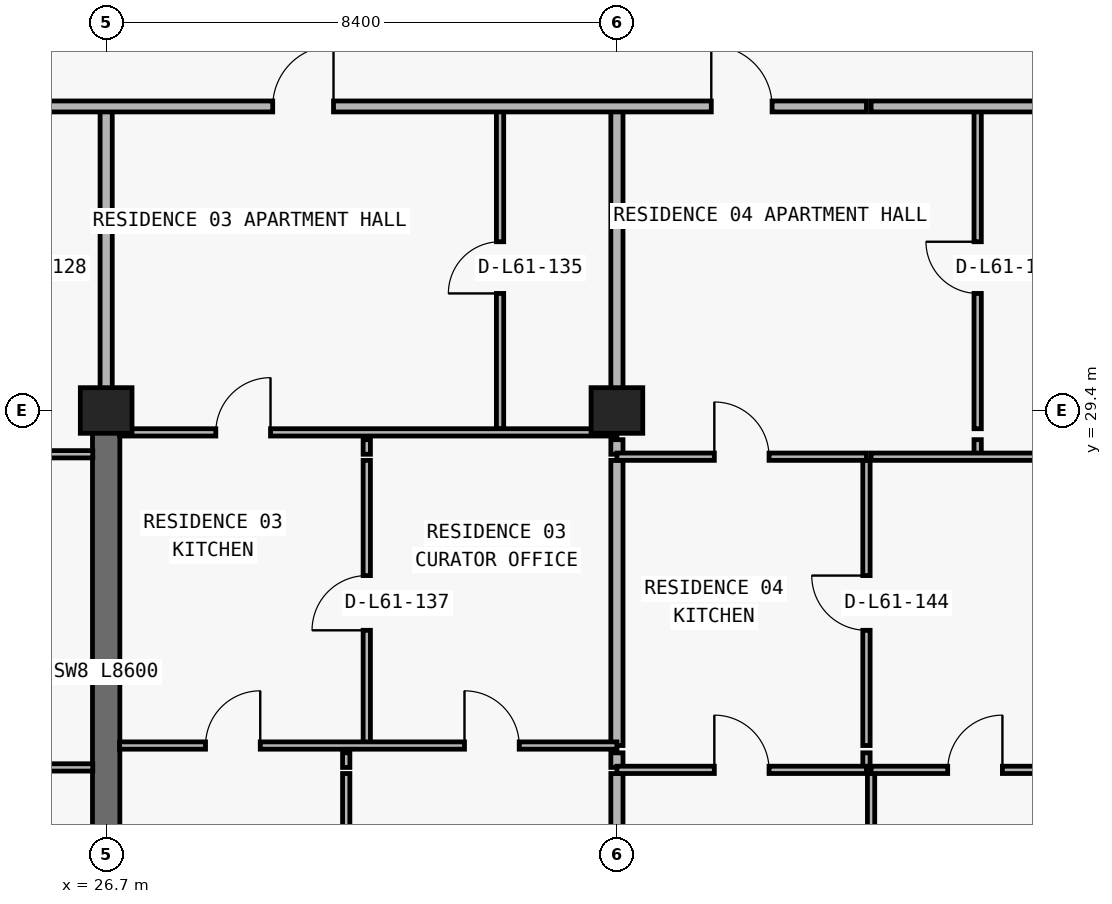
"""IFC4 building model, lengths in metres.
Left out: names, types, materials, properties, quantities, classifications, styles, units other than length and angle.
Written with IfcOpenShell. Run it as: python <this file> out.ifc"""

import sys

from ifc_helpers import new_model, si_unit, direction, frame, frame_2d, origin, origin_2d, place, context, subcontext, project, spatial, rectangle, extrude, element, fill, save


model = new_model("IFC4")
c1 = context("Model", 3, precision=1e-05, world=origin(), true_north=direction((0.0, 1.0)))
c2 = subcontext(c1, "Body", "Model", "MODEL_VIEW")
j1 = project(units=[si_unit("LENGTHUNIT", "METRE"), si_unit("PLANEANGLEUNIT", "RADIAN")], contexts=[c1])
p1 = place(None, origin())
s1 = spatial("IfcSite", under=j1, at=p1, CompositionType="ELEMENT")
p2 = place(p1, origin())
s2 = spatial("IfcBuilding", under=s1, at=p2, CompositionType="ELEMENT")
p3 = place(p2, frame((0.0, 0.0, 218.1)))
s3 = spatial("IfcBuildingStorey", under=s2, at=p3, CompositionType="ELEMENT", Elevation=218.1)
for number, where, z_axis, x_axis in (
    (1, (26.7, 29.4, 0.0), (0.0, 0.0, 1.0), (1.0, 0.0, 0.0)),
    (2, (35.1, 29.4, 0.0), (0.0, 0.0, 1.0), (1.0, 0.0, 0.0)),
):
    element("IfcColumn", number, at=place(p3, frame(where, z_axis=z_axis, x_axis=x_axis)), inside=s3, PredefinedType="COLUMN", context=c2, shape_type="SweptSolid", body=[
        extrude(rectangle(XDim=0.85, YDim=0.75, at=origin_2d()), origin(), (0.0, 0.0, 1.0), 3.0),
    ])
p4 = place(p3, frame((26.7, 20.8, 0.0), z_axis=(0.0, 0.0, 1.0), x_axis=(0.0, 1.0, 0.0)))
e3 = element("IfcWall", 3, at=p4, inside=s3, PredefinedType="SHEAR", context=c2, shape_type="SweptSolid", body=[
    extrude(rectangle(XDim=8.6, YDim=0.45, at=frame_2d((4.3, 0.0))), origin(), (0.0, 0.0, 1.0), 3.0),
])
p5 = place(p3, frame((26.7, 29.405, 0.0), z_axis=(0.0, 0.0, 1.0), x_axis=(0.0, 1.0, 0.0)))
e4 = element("IfcWall", 4, at=p5, inside=s3, PredefinedType="PARTITIONING", context=c2, shape_type="SweptSolid", body=[
    extrude(rectangle(XDim=4.995, YDim=0.2, at=frame_2d((2.498, 0.0))), origin(), (0.0, 0.0, 1.0), 2.285),
])
p6 = place(p3, frame((30.648, 11.24, 0.0), z_axis=(0.0, 0.0, 1.0), x_axis=(0.0, 1.0, 0.0)))
e5 = element("IfcWall", 5, at=p6, inside=s3, PredefinedType="PARTITIONING", context=c2, shape_type="SweptSolid", body=[
    extrude(rectangle(XDim=12.19, YDim=0.12, at=frame_2d((6.095, 0.0))), origin(), (0.0, 0.0, 1.0), 3.0),
])
p7 = place(p3, frame((30.648, 23.53, 0.0), z_axis=(0.0, 0.0, 1.0), x_axis=(0.0, 1.0, 0.0)))
e6 = element("IfcWall", 6, at=p7, inside=s3, PredefinedType="PARTITIONING", context=c2, shape_type="SweptSolid", body=[
    extrude(rectangle(XDim=0.24, YDim=0.12, at=frame_2d((0.12, 0.0))), origin(), (0.0, 0.0, 1.0), 3.0),
])
p8 = place(p3, frame((30.986, 23.89, 0.0), z_axis=(0.0, 0.0, 1.0), x_axis=(0.0, 1.0, 0.0)))
e7 = element("IfcWall", 7, at=p8, inside=s3, PredefinedType="PARTITIONING", context=c2, shape_type="SweptSolid", body=[
    extrude(rectangle(XDim=4.69, YDim=0.12, at=frame_2d((2.345, 0.0))), origin(), (0.0, 0.0, 1.0), 2.449),
])
p9 = place(p8, frame((1.895, 0.0, 0.0)))
e8 = element("IfcOpeningElement", 8, at=p9, cuts=e7, PredefinedType="OPENING", context=c2, shape_type="SweptSolid", body=[
    extrude(rectangle(XDim=0.9, YDim=2.15, at=frame_2d((0.45, 1.075))), frame((0.0, 0.07, 0.0), z_axis=(0.0, -1.0, 0.0), x_axis=(1.0, 0.0, 0.0)), (0.0, 0.0, 1.0), 0.14),
])
p10 = place(p3, frame((30.986, 28.68, 0.0), z_axis=(0.0, 0.0, 1.0), x_axis=(0.0, 1.0, 0.0)))
e9 = element("IfcWall", 9, at=p10, inside=s3, PredefinedType="PARTITIONING", context=c2, shape_type="SweptSolid", body=[
    extrude(rectangle(XDim=0.24, YDim=0.12, at=frame_2d((0.12, 0.0))), origin(), (0.0, 0.0, 1.0), 2.449),
])
p11 = place(p3, frame((33.178, 29.1, 0.0), z_axis=(0.0, 0.0, 1.0), x_axis=(0.0, 1.0, 0.0)))
e10 = element("IfcWall", 10, at=p11, inside=s3, PredefinedType="PARTITIONING", context=c2, shape_type="SweptSolid", body=[
    extrude(rectangle(XDim=5.3, YDim=0.12, at=frame_2d((2.65, 0.0))), origin(), (0.0, 0.0, 1.0), 2.675),
])
p12 = place(p11, frame((2.225, 0.0, 0.0)))
e11 = element("IfcOpeningElement", 11, at=p12, cuts=e10, PredefinedType="OPENING", context=c2, shape_type="SweptSolid", body=[
    extrude(rectangle(XDim=0.85, YDim=2.1, at=frame_2d((0.425, 1.05))), frame((0.0, 0.07, 0.0), z_axis=(0.0, -1.0, 0.0), x_axis=(1.0, 0.0, 0.0)), (0.0, 0.0, 1.0), 0.14),
])
p13 = place(p3, frame((35.1, 11.24, 0.0), z_axis=(0.0, 0.0, 1.0), x_axis=(0.0, 1.0, 0.0)))
e12 = element("IfcWall", 12, at=p13, inside=s3, PredefinedType="PARTITIONING", context=c2, shape_type="SweptSolid", body=[
    extrude(rectangle(XDim=12.19, YDim=0.2, at=frame_2d((6.095, 0.0))), origin(), (0.0, 0.0, 1.0), 2.213),
])
p14 = place(p3, frame((35.1, 23.53, 0.0), z_axis=(0.0, 0.0, 1.0), x_axis=(0.0, 1.0, 0.0)))
e13 = element("IfcWall", 13, at=p14, inside=s3, PredefinedType="PARTITIONING", context=c2, shape_type="SweptSolid", body=[
    extrude(rectangle(XDim=0.24, YDim=0.2, at=frame_2d((0.12, 0.0))), origin(), (0.0, 0.0, 1.0), 2.213),
])
p15 = place(p3, frame((35.1, 23.89, 0.0), z_axis=(0.0, 0.0, 1.0), x_axis=(0.0, 1.0, 0.0)))
e14 = element("IfcWall", 14, at=p15, inside=s3, PredefinedType="PARTITIONING", context=c2, shape_type="SweptSolid", body=[
    extrude(rectangle(XDim=4.69, YDim=0.2, at=frame_2d((2.345, 0.0))), origin(), (0.0, 0.0, 1.0), 2.213),
])
p16 = place(p3, frame((35.1, 28.68, 0.0), z_axis=(0.0, 0.0, 1.0), x_axis=(0.0, 1.0, 0.0)))
e15 = element("IfcWall", 15, at=p16, inside=s3, PredefinedType="PARTITIONING", context=c2, shape_type="SweptSolid", body=[
    extrude(rectangle(XDim=0.24, YDim=0.2, at=frame_2d((0.12, 0.0))), origin(), (0.0, 0.0, 1.0), 2.213),
])
p17 = place(p3, frame((35.1, 29.1, 0.0), z_axis=(0.0, 0.0, 1.0), x_axis=(0.0, 1.0, 0.0)))
e16 = element("IfcWall", 16, at=p17, inside=s3, PredefinedType="PARTITIONING", context=c2, shape_type="SweptSolid", body=[
    extrude(rectangle(XDim=5.3, YDim=0.2, at=frame_2d((2.65, 0.0))), origin(), (0.0, 0.0, 1.0), 2.213),
])
p18 = place(p3, frame((39.204, 23.53, 0.0), z_axis=(0.0, 0.0, 1.0), x_axis=(0.0, 1.0, 0.0)))
e17 = element("IfcWall", 17, at=p18, inside=s3, PredefinedType="PARTITIONING", context=c2, shape_type="SweptSolid", body=[
    extrude(rectangle(XDim=0.24, YDim=0.12, at=frame_2d((0.12, 0.0))), origin(), (0.0, 0.0, 1.0), 3.0),
])
p19 = place(p3, frame((39.204, 23.89, 0.0), z_axis=(0.0, 0.0, 1.0), x_axis=(0.0, 1.0, 0.0)))
e18 = element("IfcWall", 18, at=p19, inside=s3, PredefinedType="PARTITIONING", context=c2, shape_type="SweptSolid", body=[
    extrude(rectangle(XDim=4.69, YDim=0.12, at=frame_2d((2.345, 0.0))), origin(), (0.0, 0.0, 1.0), 3.0),
])
p20 = place(p19, frame((1.895, 0.0, 0.0)))
e19 = element("IfcOpeningElement", 19, at=p20, cuts=e18, PredefinedType="OPENING", context=c2, shape_type="SweptSolid", body=[
    extrude(rectangle(XDim=0.9, YDim=2.15, at=frame_2d((0.45, 1.075))), frame((0.0, 0.07, 0.0), z_axis=(0.0, -1.0, 0.0), x_axis=(1.0, 0.0, 0.0)), (0.0, 0.0, 1.0), 0.14),
])
p21 = place(p3, frame((39.28, 11.24, 0.0), z_axis=(0.0, 0.0, 1.0), x_axis=(0.0, 1.0, 0.0)))
e20 = element("IfcWall", 20, at=p21, inside=s3, PredefinedType="PARTITIONING", context=c2, shape_type="SweptSolid", body=[
    extrude(rectangle(XDim=12.19, YDim=0.12, at=frame_2d((6.095, 0.0))), origin(), (0.0, 0.0, 1.0), 3.0),
])
p22 = place(p3, frame((41.033, 28.68, 0.0), z_axis=(0.0, 0.0, 1.0), x_axis=(0.0, 1.0, 0.0)))
e21 = element("IfcWall", 21, at=p22, inside=s3, PredefinedType="PARTITIONING", context=c2, shape_type="SweptSolid", body=[
    extrude(rectangle(XDim=0.24, YDim=0.12, at=frame_2d((0.12, 0.0))), origin(), (0.0, 0.0, 1.0), 2.675),
])
p23 = place(p3, frame((41.033, 29.1, 0.0), z_axis=(0.0, 0.0, 1.0), x_axis=(0.0, 1.0, 0.0)))
e22 = element("IfcWall", 22, at=p23, inside=s3, PredefinedType="PARTITIONING", context=c2, shape_type="SweptSolid", body=[
    extrude(rectangle(XDim=5.3, YDim=0.12, at=frame_2d((2.65, 0.0))), origin(), (0.0, 0.0, 1.0), 2.675),
])
p24 = place(p23, frame((2.225, 0.0, 0.0)))
e23 = element("IfcOpeningElement", 23, at=p24, cuts=e22, PredefinedType="OPENING", context=c2, shape_type="SweptSolid", body=[
    extrude(rectangle(XDim=0.85, YDim=2.1, at=frame_2d((0.425, 1.05))), frame((0.0, 0.07, 0.0), z_axis=(0.0, -1.0, 0.0), x_axis=(1.0, 0.0, 0.0)), (0.0, 0.0, 1.0), 0.14),
])
p25 = place(p3, frame((35.1, 23.49, 0.0), z_axis=(0.0, 0.0, 1.0), x_axis=(1.0, 0.0, 0.0)))
e24 = element("IfcWall", 24, at=p25, inside=s3, PredefinedType="PARTITIONING", context=c2, shape_type="SweptSolid", body=[
    extrude(rectangle(XDim=4.104, YDim=0.12, at=frame_2d((2.052, 0.0))), origin(), (0.0, 0.0, 1.0), 3.0),
])
p26 = place(p25, frame((1.602, 0.0, 0.0)))
e25 = element("IfcOpeningElement", 25, at=p26, cuts=e24, PredefinedType="OPENING", context=c2, shape_type="SweptSolid", body=[
    extrude(rectangle(XDim=0.9, YDim=2.15, at=frame_2d((0.45, 1.075))), frame((0.0, 0.07, 0.0), z_axis=(0.0, -1.0, 0.0), x_axis=(1.0, 0.0, 0.0)), (0.0, 0.0, 1.0), 0.14),
])
p27 = place(p3, frame((39.28, 23.49, 0.0), z_axis=(0.0, 0.0, 1.0), x_axis=(1.0, 0.0, 0.0)))
e26 = element("IfcWall", 26, at=p27, inside=s3, PredefinedType="PARTITIONING", context=c2, shape_type="SweptSolid", body=[
    extrude(rectangle(XDim=3.42, YDim=0.12, at=frame_2d((1.71, 0.0))), origin(), (0.0, 0.0, 1.0), 3.0),
])
p28 = place(p27, frame((1.26, 0.0, 0.0)))
e27 = element("IfcOpeningElement", 27, at=p28, cuts=e26, PredefinedType="OPENING", context=c2, shape_type="SweptSolid", body=[
    extrude(rectangle(XDim=0.9, YDim=2.15, at=frame_2d((0.45, 1.075))), frame((0.0, 0.07, 0.0), z_axis=(0.0, -1.0, 0.0), x_axis=(1.0, 0.0, 0.0)), (0.0, 0.0, 1.0), 0.14),
])
p29 = place(p3, frame((18.3, 23.53, 0.0), z_axis=(0.0, 0.0, 1.0), x_axis=(1.0, 0.0, 0.0)))
e28 = element("IfcWall", 28, at=p29, inside=s3, PredefinedType="PARTITIONING", context=c2, shape_type="SweptSolid", body=[
    extrude(rectangle(XDim=8.18, YDim=0.12, at=frame_2d((4.09, 0.0))), origin(), (0.0, 0.0, 1.0), 3.0),
])
p30 = place(p29, frame((1.86, 0.0, 0.0)))
e29 = element("IfcOpeningElement", 29, at=p30, cuts=e28, PredefinedType="OPENING", context=c2, shape_type="SweptSolid", body=[
    extrude(rectangle(XDim=0.9, YDim=2.15, at=frame_2d((0.45, 1.075))), frame((0.0, 0.07, 0.0), z_axis=(0.0, -1.0, 0.0), x_axis=(1.0, 0.0, 0.0)), (0.0, 0.0, 1.0), 0.14),
])
p31 = place(p29, frame((6.033, 0.0, 0.0)))
e30 = element("IfcOpeningElement", 30, at=p31, cuts=e28, PredefinedType="OPENING", context=c2, shape_type="SweptSolid", body=[
    extrude(rectangle(XDim=0.9, YDim=2.15, at=frame_2d((0.45, 1.075))), frame((0.0, 0.07, 0.0), z_axis=(0.0, -1.0, 0.0), x_axis=(1.0, 0.0, 0.0)), (0.0, 0.0, 1.0), 0.14),
])
p32 = place(p3, frame((26.92, 23.89, 0.0), z_axis=(0.0, 0.0, 1.0), x_axis=(1.0, 0.0, 0.0)))
e31 = element("IfcWall", 31, at=p32, inside=s3, PredefinedType="PARTITIONING", context=c2, shape_type="SweptSolid", body=[
    extrude(rectangle(XDim=8.18, YDim=0.12, at=frame_2d((4.09, 0.0))), origin(), (0.0, 0.0, 1.0), 3.0),
])
p33 = place(p32, frame((1.414, 0.0, 0.0)))
e32 = element("IfcOpeningElement", 32, at=p33, cuts=e31, PredefinedType="OPENING", context=c2, shape_type="SweptSolid", body=[
    extrude(rectangle(XDim=0.9, YDim=2.15, at=frame_2d((0.45, 1.075))), frame((0.0, 0.07, 0.0), z_axis=(0.0, -1.0, 0.0), x_axis=(1.0, 0.0, 0.0)), (0.0, 0.0, 1.0), 0.14),
])
p34 = place(p32, frame((5.673, 0.0, 0.0)))
e33 = element("IfcOpeningElement", 33, at=p34, cuts=e31, PredefinedType="OPENING", context=c2, shape_type="SweptSolid", body=[
    extrude(rectangle(XDim=0.9, YDim=2.15, at=frame_2d((0.45, 1.075))), frame((0.0, 0.07, 0.0), z_axis=(0.0, -1.0, 0.0), x_axis=(1.0, 0.0, 0.0)), (0.0, 0.0, 1.0), 0.14),
])
p35 = place(p3, frame((35.1, 28.64, 0.0), z_axis=(0.0, 0.0, 1.0), x_axis=(1.0, 0.0, 0.0)))
e34 = element("IfcWall", 34, at=p35, inside=s3, PredefinedType="PARTITIONING", context=c2, shape_type="SweptSolid", body=[
    extrude(rectangle(XDim=4.104, YDim=0.12, at=frame_2d((2.052, 0.0))), origin(), (0.0, 0.0, 1.0), 3.0),
])
p36 = place(p35, frame((1.602, 0.0, 0.0)))
e35 = element("IfcOpeningElement", 35, at=p36, cuts=e34, PredefinedType="OPENING", context=c2, shape_type="SweptSolid", body=[
    extrude(rectangle(XDim=0.9, YDim=2.15, at=frame_2d((0.45, 1.075))), frame((0.0, 0.07, 0.0), z_axis=(0.0, -1.0, 0.0), x_axis=(1.0, 0.0, 0.0)), (0.0, 0.0, 1.0), 0.14),
])
p37 = place(p3, frame((39.28, 28.64, 0.0), z_axis=(0.0, 0.0, 1.0), x_axis=(1.0, 0.0, 0.0)))
e36 = element("IfcWall", 36, at=p37, inside=s3, PredefinedType="PARTITIONING", context=c2, shape_type="SweptSolid", body=[
    extrude(rectangle(XDim=3.42, YDim=0.12, at=frame_2d((1.71, 0.0))), origin(), (0.0, 0.0, 1.0), 3.0),
])
p38 = place(p3, frame((18.3, 28.68, 0.0), z_axis=(0.0, 0.0, 1.0), x_axis=(1.0, 0.0, 0.0)))
e37 = element("IfcWall", 37, at=p38, inside=s3, PredefinedType="PARTITIONING", context=c2, shape_type="SweptSolid", body=[
    extrude(rectangle(XDim=8.18, YDim=0.12, at=frame_2d((4.09, 0.0))), origin(), (0.0, 0.0, 1.0), 3.0),
])
p39 = place(p38, frame((1.943, 0.0, 0.0)))
e38 = element("IfcOpeningElement", 38, at=p39, cuts=e37, PredefinedType="OPENING", context=c2, shape_type="SweptSolid", body=[
    extrude(rectangle(XDim=0.9, YDim=2.15, at=frame_2d((0.45, 1.075))), frame((0.0, 0.07, 0.0), z_axis=(0.0, -1.0, 0.0), x_axis=(1.0, 0.0, 0.0)), (0.0, 0.0, 1.0), 0.14),
])
p40 = place(p3, frame((26.92, 29.04, 0.0), z_axis=(0.0, 0.0, 1.0), x_axis=(1.0, 0.0, 0.0)))
e39 = element("IfcWall", 39, at=p40, inside=s3, PredefinedType="PARTITIONING", context=c2, shape_type="SweptSolid", body=[
    extrude(rectangle(XDim=8.18, YDim=0.12, at=frame_2d((4.09, 0.0))), origin(), (0.0, 0.0, 1.0), 3.0),
])
p41 = place(p40, frame((1.583, 0.0, 0.0)))
e40 = element("IfcOpeningElement", 40, at=p41, cuts=e39, PredefinedType="OPENING", context=c2, shape_type="SweptSolid", body=[
    extrude(rectangle(XDim=0.9, YDim=2.15, at=frame_2d((0.45, 1.075))), frame((0.0, 0.07, 0.0), z_axis=(0.0, -1.0, 0.0), x_axis=(1.0, 0.0, 0.0)), (0.0, 0.0, 1.0), 0.14),
])
p42 = place(p3, frame((10.105, 34.4, 0.0), z_axis=(0.0, 0.0, 1.0), x_axis=(1.0, 0.0, 0.0)))
e41 = element("IfcWall", 41, at=p42, inside=s3, PredefinedType="PARTITIONING", context=c2, shape_type="SweptSolid", body=[
    extrude(rectangle(XDim=29.099, YDim=0.18, at=frame_2d((14.55, 0.0))), origin(), (0.0, 0.0, 1.0), 3.0),
])
p43 = place(p42, frame((2.647, 0.0, 0.0)))
e42 = element("IfcOpeningElement", 42, at=p43, cuts=e41, PredefinedType="OPENING", context=c2, shape_type="SweptSolid", body=[
    extrude(rectangle(XDim=1.0, YDim=2.2, at=frame_2d((0.5, 1.1))), frame((0.0, 0.1, 0.0), z_axis=(0.0, -1.0, 0.0), x_axis=(1.0, 0.0, 0.0)), (0.0, 0.0, 1.0), 0.2),
])
p44 = place(p42, frame((11.056, 0.0, 0.0)))
e43 = element("IfcOpeningElement", 43, at=p44, cuts=e41, PredefinedType="OPENING", context=c2, shape_type="SweptSolid", body=[
    extrude(rectangle(XDim=1.0, YDim=2.2, at=frame_2d((0.5, 1.1))), frame((0.0, 0.1, 0.0), z_axis=(0.0, -1.0, 0.0), x_axis=(1.0, 0.0, 0.0)), (0.0, 0.0, 1.0), 0.2),
])
p45 = place(p42, frame((19.334, 0.0, 0.0)))
e44 = element("IfcOpeningElement", 44, at=p45, cuts=e41, PredefinedType="OPENING", context=c2, shape_type="SweptSolid", body=[
    extrude(rectangle(XDim=1.0, YDim=2.2, at=frame_2d((0.5, 1.1))), frame((0.0, 0.1, 0.0), z_axis=(0.0, -1.0, 0.0), x_axis=(1.0, 0.0, 0.0)), (0.0, 0.0, 1.0), 0.2),
])
p46 = place(p42, frame((26.547, 0.0, 0.0)))
e45 = element("IfcOpeningElement", 45, at=p46, cuts=e41, PredefinedType="OPENING", context=c2, shape_type="SweptSolid", body=[
    extrude(rectangle(XDim=1.0, YDim=2.2, at=frame_2d((0.5, 1.1))), frame((0.0, 0.1, 0.0), z_axis=(0.0, -1.0, 0.0), x_axis=(1.0, 0.0, 0.0)), (0.0, 0.0, 1.0), 0.2),
])
p47 = place(p3, frame((39.28, 34.4, 0.0), z_axis=(0.0, 0.0, 1.0), x_axis=(1.0, 0.0, 0.0)))
e46 = element("IfcWall", 46, at=p47, inside=s3, PredefinedType="PARTITIONING", context=c2, shape_type="SweptSolid", body=[
    extrude(rectangle(XDim=28.42, YDim=0.18, at=frame_2d((14.21, 0.0))), origin(), (0.0, 0.0, 1.0), 3.0),
])
p48 = place(p47, frame((6.18, 0.0, 0.0)))
e47 = element("IfcOpeningElement", 47, at=p48, cuts=e46, PredefinedType="OPENING", context=c2, shape_type="SweptSolid", body=[
    extrude(rectangle(XDim=1.0, YDim=2.2, at=frame_2d((0.5, 1.1))), frame((0.0, 0.1, 0.0), z_axis=(0.0, -1.0, 0.0), x_axis=(1.0, 0.0, 0.0)), (0.0, 0.0, 1.0), 0.2),
])
p49 = place(p47, frame((14.695, 0.0, 0.0)))
e48 = element("IfcOpeningElement", 48, at=p49, cuts=e46, PredefinedType="OPENING", context=c2, shape_type="SweptSolid", body=[
    extrude(rectangle(XDim=1.0, YDim=2.2, at=frame_2d((0.5, 1.1))), frame((0.0, 0.1, 0.0), z_axis=(0.0, -1.0, 0.0), x_axis=(1.0, 0.0, 0.0)), (0.0, 0.0, 1.0), 0.2),
])
p50 = place(p47, frame((22.87, 0.0, 0.0)))
e49 = element("IfcOpeningElement", 49, at=p50, cuts=e46, PredefinedType="OPENING", context=c2, shape_type="SweptSolid", body=[
    extrude(rectangle(XDim=1.0, YDim=2.2, at=frame_2d((0.5, 1.1))), frame((0.0, 0.1, 0.0), z_axis=(0.0, -1.0, 0.0), x_axis=(1.0, 0.0, 0.0)), (0.0, 0.0, 1.0), 0.2),
])
p51 = place(p45, origin())
e50 = element("IfcDoor", 50, at=p51, inside=s3, OperationType="SINGLE_SWING_RIGHT", PredefinedType="DOOR", context=c2, shape_type="SweptSolid", body=[
    extrude(rectangle(XDim=1.0, YDim=2.2, at=frame_2d((0.5, 1.1))), frame((0.0, 0.025, 0.0), z_axis=(0.0, -1.0, 0.0), x_axis=(1.0, 0.0, 0.0)), (0.0, 0.0, 1.0), 0.05),
])
fill(e44, e50)
p52 = place(p12, origin())
e51 = element("IfcDoor", 51, at=p52, inside=s3, OperationType="SINGLE_SWING_LEFT", PredefinedType="DOOR", context=c2, shape_type="SweptSolid", body=[
    extrude(rectangle(XDim=0.85, YDim=2.1, at=frame_2d((0.425, 1.05))), frame((0.0, 0.025, 0.0), z_axis=(0.0, -1.0, 0.0), x_axis=(1.0, 0.0, 0.0)), (0.0, 0.0, 1.0), 0.05),
])
fill(e11, e51)
p53 = place(p41, origin())
e52 = element("IfcDoor", 52, at=p53, inside=s3, OperationType="SINGLE_SWING_RIGHT", PredefinedType="DOOR", context=c2, shape_type="SweptSolid", body=[
    extrude(rectangle(XDim=0.9, YDim=2.15, at=frame_2d((0.45, 1.075))), frame((0.0, 0.025, 0.0), z_axis=(0.0, -1.0, 0.0), x_axis=(1.0, 0.0, 0.0)), (0.0, 0.0, 1.0), 0.05),
])
fill(e40, e52)
p54 = place(p9, origin())
e53 = element("IfcDoor", 53, at=p54, inside=s3, OperationType="SINGLE_SWING_LEFT", PredefinedType="DOOR", context=c2, shape_type="SweptSolid", body=[
    extrude(rectangle(XDim=0.9, YDim=2.15, at=frame_2d((0.45, 1.075))), frame((0.0, 0.025, 0.0), z_axis=(0.0, -1.0, 0.0), x_axis=(1.0, 0.0, 0.0)), (0.0, 0.0, 1.0), 0.05),
])
fill(e8, e53)
p55 = place(p33, origin())
e54 = element("IfcDoor", 54, at=p55, inside=s3, OperationType="SINGLE_SWING_RIGHT", PredefinedType="DOOR", context=c2, shape_type="SweptSolid", body=[
    extrude(rectangle(XDim=0.9, YDim=2.15, at=frame_2d((0.45, 1.075))), frame((0.0, 0.025, 0.0), z_axis=(0.0, -1.0, 0.0), x_axis=(1.0, 0.0, 0.0)), (0.0, 0.0, 1.0), 0.05),
])
fill(e32, e54)
p56 = place(p34, origin())
e55 = element("IfcDoor", 55, at=p56, inside=s3, OperationType="SINGLE_SWING_LEFT", PredefinedType="DOOR", context=c2, shape_type="SweptSolid", body=[
    extrude(rectangle(XDim=0.9, YDim=2.15, at=frame_2d((0.45, 1.075))), frame((0.0, 0.025, 0.0), z_axis=(0.0, -1.0, 0.0), x_axis=(1.0, 0.0, 0.0)), (0.0, 0.0, 1.0), 0.05),
])
fill(e33, e55)
p57 = place(p46, origin())
e56 = element("IfcDoor", 56, at=p57, inside=s3, OperationType="SINGLE_SWING_LEFT", PredefinedType="DOOR", context=c2, shape_type="SweptSolid", body=[
    extrude(rectangle(XDim=1.0, YDim=2.2, at=frame_2d((0.5, 1.1))), frame((0.0, 0.025, 0.0), z_axis=(0.0, -1.0, 0.0), x_axis=(1.0, 0.0, 0.0)), (0.0, 0.0, 1.0), 0.05),
])
fill(e45, e56)
p58 = place(p24, origin())
e57 = element("IfcDoor", 57, at=p58, inside=s3, OperationType="SINGLE_SWING_RIGHT", PredefinedType="DOOR", context=c2, shape_type="SweptSolid", body=[
    extrude(rectangle(XDim=0.85, YDim=2.1, at=frame_2d((0.425, 1.05))), frame((0.0, 0.025, 0.0), z_axis=(0.0, -1.0, 0.0), x_axis=(1.0, 0.0, 0.0)), (0.0, 0.0, 1.0), 0.05),
])
fill(e23, e57)
p59 = place(p36, origin())
e58 = element("IfcDoor", 58, at=p59, inside=s3, OperationType="SINGLE_SWING_LEFT", PredefinedType="DOOR", context=c2, shape_type="SweptSolid", body=[
    extrude(rectangle(XDim=0.9, YDim=2.15, at=frame_2d((0.45, 1.075))), frame((0.0, 0.025, 0.0), z_axis=(0.0, -1.0, 0.0), x_axis=(1.0, 0.0, 0.0)), (0.0, 0.0, 1.0), 0.05),
])
fill(e35, e58)
p60 = place(p20, origin())
e59 = element("IfcDoor", 59, at=p60, inside=s3, OperationType="SINGLE_SWING_RIGHT", PredefinedType="DOOR", context=c2, shape_type="SweptSolid", body=[
    extrude(rectangle(XDim=0.9, YDim=2.15, at=frame_2d((0.45, 1.075))), frame((0.0, 0.025, 0.0), z_axis=(0.0, -1.0, 0.0), x_axis=(1.0, 0.0, 0.0)), (0.0, 0.0, 1.0), 0.05),
])
fill(e19, e59)
p61 = place(p26, origin())
e60 = element("IfcDoor", 60, at=p61, inside=s3, OperationType="SINGLE_SWING_LEFT", PredefinedType="DOOR", context=c2, shape_type="SweptSolid", body=[
    extrude(rectangle(XDim=0.9, YDim=2.15, at=frame_2d((0.45, 1.075))), frame((0.0, 0.025, 0.0), z_axis=(0.0, -1.0, 0.0), x_axis=(1.0, 0.0, 0.0)), (0.0, 0.0, 1.0), 0.05),
])
fill(e25, e60)
p62 = place(p28, origin())
e61 = element("IfcDoor", 61, at=p62, inside=s3, OperationType="SINGLE_SWING_RIGHT", PredefinedType="DOOR", context=c2, shape_type="SweptSolid", body=[
    extrude(rectangle(XDim=0.9, YDim=2.15, at=frame_2d((0.45, 1.075))), frame((0.0, 0.025, 0.0), z_axis=(0.0, -1.0, 0.0), x_axis=(1.0, 0.0, 0.0)), (0.0, 0.0, 1.0), 0.05),
])
fill(e27, e61)
save(model, sys.argv[1])
